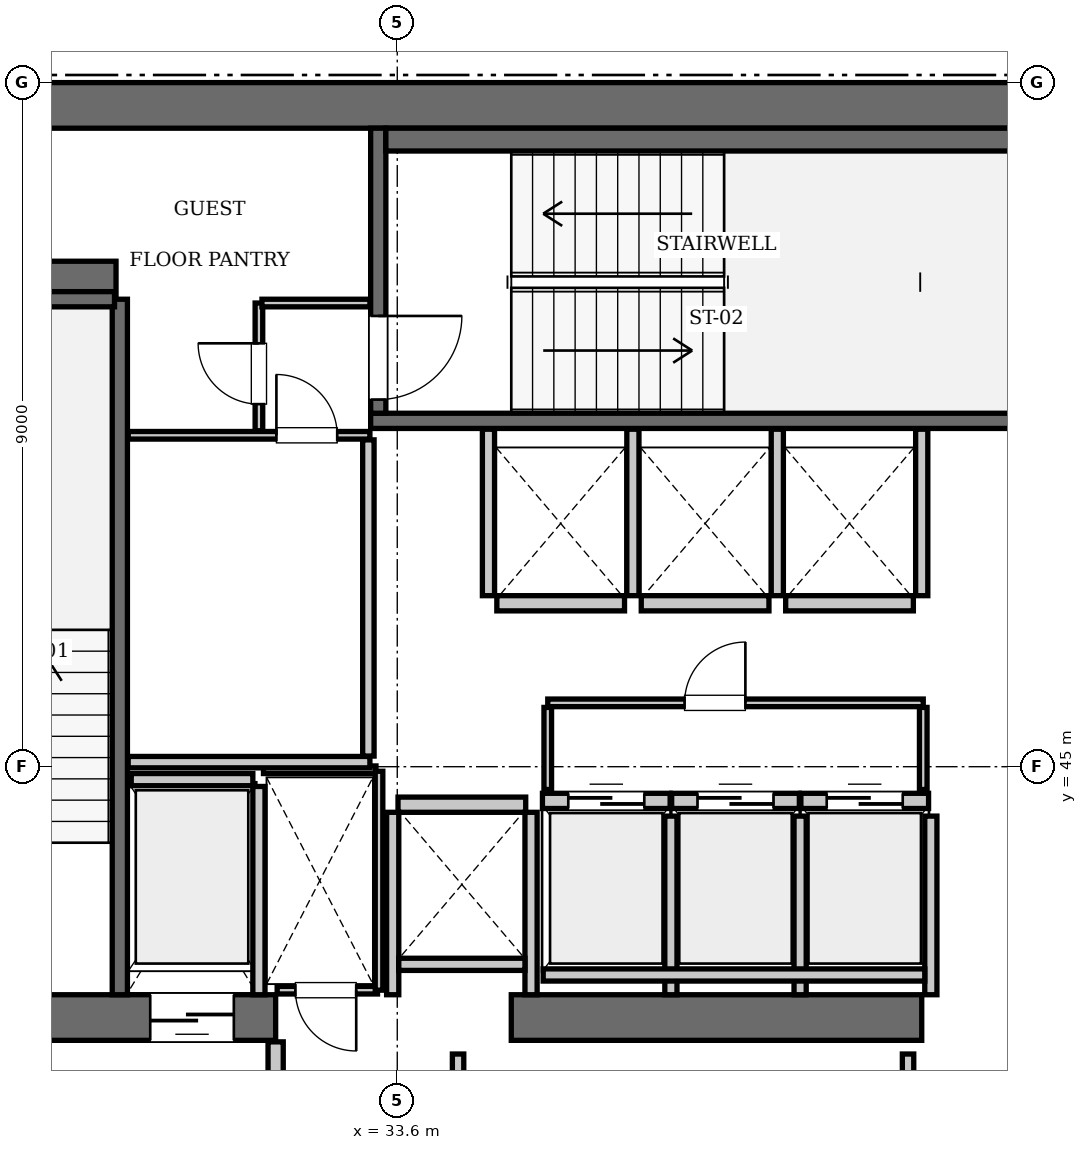
"""IFC4 building model, lengths in metres.
Left out: names, types, materials, properties, quantities, classifications, styles, units other than length and angle.
Written with IfcOpenShell. Run it as: python <this file> out.ifc"""

import sys

from ifc_helpers import new_model, si_unit, direction, frame, frame_2d, origin, place, context, subcontext, project, spatial, rectangle, extrude, element, fill, save


model = new_model("IFC4")
c1 = context("Model", 3, precision=1e-05, world=origin(), true_north=direction((0.0, 1.0)))
c2 = subcontext(c1, "Body", "Model", "MODEL_VIEW")
j1 = project(units=[si_unit("LENGTHUNIT", "METRE"), si_unit("PLANEANGLEUNIT", "RADIAN")], contexts=[c1])
p1 = place(None, origin())
s1 = spatial("IfcSite", under=j1, at=p1, CompositionType="ELEMENT")
p2 = place(p1, origin())
s2 = spatial("IfcBuilding", under=s1, at=p2, CompositionType="ELEMENT")
p3 = place(p2, frame((0.0, 0.0, 258.65)))
s3 = spatial("IfcBuildingStorey", under=s2, at=p3, CompositionType="ELEMENT", Elevation=258.65)
p4 = place(p3, frame((25.2, 53.7, 0.0), z_axis=(0.0, 0.0, 1.0), x_axis=(1.0, 0.0, 0.0)))
e1 = element("IfcWall", 1, at=p4, inside=s3, PredefinedType="SHEAR", context=c2, shape_type="SweptSolid", body=[
    extrude(rectangle(XDim=25.2, YDim=0.6, at=frame_2d((12.6, 0.0))), origin(), (0.0, 0.0, 1.0), 3.85),
])
p5 = place(p3, frame((25.2, 41.7, 0.0), z_axis=(0.0, 0.0, 1.0), x_axis=(1.0, 0.0, 0.0)))
e2 = element("IfcWall", 2, at=p5, inside=s3, PredefinedType="SHEAR", context=c2, shape_type="SweptSolid", body=[
    extrude(rectangle(XDim=6.8, YDim=0.6, at=frame_2d((3.4, 0.0))), origin(), (0.0, 0.0, 1.0), 3.85),
])
p6 = place(p5, frame((1.65, 0.0, 0.0)))
e3 = element("IfcOpeningElement", 3, at=p6, cuts=e2, PredefinedType="OPENING", context=c2, shape_type="SweptSolid", body=[
    extrude(rectangle(XDim=1.15, YDim=2.15, at=frame_2d((0.575, 1.075))), frame((0.0, 0.31, 0.0), z_axis=(0.0, -1.0, 0.0), x_axis=(1.0, 0.0, 0.0)), (0.0, 0.0, 1.0), 0.62),
])
p7 = place(p5, frame((5.15, 0.0, 0.0)))
e4 = element("IfcOpeningElement", 4, at=p7, cuts=e2, PredefinedType="OPENING", context=c2, shape_type="SweptSolid", body=[
    extrude(rectangle(XDim=1.1, YDim=2.2, at=frame_2d((0.55, 1.1))), frame((0.0, 0.31, 0.0), z_axis=(0.0, -1.0, 0.0), x_axis=(1.0, 0.0, 0.0)), (0.0, 0.0, 1.0), 0.62),
])
p8 = place(p3, frame((35.1, 41.7, 0.0), z_axis=(0.0, 0.0, 1.0), x_axis=(1.0, 0.0, 0.0)))
e5 = element("IfcWall", 5, at=p8, inside=s3, PredefinedType="SHEAR", context=c2, shape_type="SweptSolid", body=[
    extrude(rectangle(XDim=5.4, YDim=0.6, at=frame_2d((2.7, 0.0))), origin(), (0.0, 0.0, 1.0), 3.85),
])
p9 = place(p3, frame((25.8, 51.4, 0.0), z_axis=(0.0, 0.0, 1.0), x_axis=(1.0, 0.0, 0.0)))
e6 = element("IfcWall", 6, at=p9, inside=s3, PredefinedType="SHEAR", context=c2, shape_type="SweptSolid", body=[
    extrude(rectangle(XDim=4.1, YDim=0.5, at=frame_2d((2.05, 0.0))), origin(), (0.0, 0.0, 1.0), 3.85),
])
p10 = place(p3, frame((29.95, 42.0, 0.0), z_axis=(0.0, 0.0, 1.0), x_axis=(0.0, 1.0, 0.0)))
e7 = element("IfcWall", 7, at=p10, inside=s3, PredefinedType="SOLIDWALL", context=c2, shape_type="SweptSolid", body=[
    extrude(rectangle(XDim=9.15, YDim=0.2, at=frame_2d((4.575, 0.0))), origin(), (0.0, 0.0, 1.0), 3.61),
])
p11 = place(p3, frame((26.38, 51.15, 0.0), z_axis=(0.0, 0.0, 1.0), x_axis=(1.0, 0.0, 0.0)))
e8 = element("IfcWall", 8, at=p11, inside=s3, PredefinedType="SOLIDWALL", context=c2, shape_type="SweptSolid", body=[
    extrude(rectangle(XDim=3.5, YDim=0.2, at=frame_2d((1.75, 0.0))), origin(), (0.0, 0.0, 1.0), 3.61),
])
p12 = place(p3, frame((33.25, 49.55, 0.0), z_axis=(0.0, 0.0, 1.0), x_axis=(1.0, 0.0, 0.0)))
e9 = element("IfcWall", 9, at=p12, inside=s3, PredefinedType="SOLIDWALL", context=c2, shape_type="SweptSolid", body=[
    extrude(rectangle(XDim=9.1, YDim=0.2, at=frame_2d((4.55, 0.0))), origin(), (0.0, 0.0, 1.0), 3.61),
])
p13 = place(p3, frame((33.35, 49.65, 0.0), z_axis=(0.0, 0.0, 1.0), x_axis=(0.0, 1.0, 0.0)))
e10 = element("IfcWall", 10, at=p13, inside=s3, PredefinedType="SOLIDWALL", context=c2, shape_type="SweptSolid", body=[
    extrude(rectangle(XDim=3.75, YDim=0.2, at=frame_2d((1.875, 0.0))), origin(), (0.0, 0.0, 1.0), 3.61),
])
p14 = place(p13, frame((0.18, 0.0, 0.0)))
e11 = element("IfcOpeningElement", 11, at=p14, cuts=e10, PredefinedType="OPENING", context=c2, shape_type="SweptSolid", body=[
    extrude(rectangle(XDim=1.1, YDim=2.15, at=frame_2d((0.55, 1.075))), frame((0.0, 0.11, 0.0), z_axis=(0.0, -1.0, 0.0), x_axis=(1.0, 0.0, 0.0)), (0.0, 0.0, 1.0), 0.22),
])
p15 = place(p3, frame((33.45, 53.25, 0.0), z_axis=(0.0, 0.0, 1.0), x_axis=(1.0, 0.0, 0.0)))
e12 = element("IfcWall", 12, at=p15, inside=s3, PredefinedType="SOLIDWALL", context=c2, shape_type="SweptSolid", body=[
    extrude(rectangle(XDim=8.7, YDim=0.3, at=frame_2d((4.35, 0.0))), origin(), (0.0, 0.0, 1.0), 3.61),
])
p16 = place(p3, frame((35.51, 44.55, 0.0), z_axis=(0.0, 0.0, 1.0), x_axis=(1.0, 0.0, 0.0)))
e13 = element("IfcWall", 13, at=p16, inside=s3, PredefinedType="SOLIDWALL", context=c2, shape_type="SweptSolid", body=[
    extrude(rectangle(XDim=1.68, YDim=0.2, at=frame_2d((0.84, 0.0))), origin(), (0.0, 0.0, 1.0), 3.61),
])
p17 = place(p16, frame((0.34, 0.0, 0.0)))
e14 = element("IfcOpeningElement", 14, at=p17, cuts=e13, PredefinedType="OPENING", context=c2, shape_type="SweptSolid", body=[
    extrude(rectangle(XDim=1.0, YDim=2.15, at=frame_2d((0.5, 1.075))), frame((0.0, 0.11, 0.0), z_axis=(0.0, -1.0, 0.0), x_axis=(1.0, 0.0, 0.0)), (0.0, 0.0, 1.0), 0.22),
])
p18 = place(p3, frame((37.21, 44.55, 0.0), z_axis=(0.0, 0.0, 1.0), x_axis=(1.0, 0.0, 0.0)))
e15 = element("IfcWall", 15, at=p18, inside=s3, PredefinedType="SOLIDWALL", context=c2, shape_type="SweptSolid", body=[
    extrude(rectangle(XDim=1.68, YDim=0.2, at=frame_2d((0.84, 0.0))), origin(), (0.0, 0.0, 1.0), 3.61),
])
p19 = place(p18, frame((0.34, 0.0, 0.0)))
e16 = element("IfcOpeningElement", 16, at=p19, cuts=e15, PredefinedType="OPENING", context=c2, shape_type="SweptSolid", body=[
    extrude(rectangle(XDim=1.0, YDim=2.15, at=frame_2d((0.5, 1.075))), frame((0.0, 0.11, 0.0), z_axis=(0.0, -1.0, 0.0), x_axis=(1.0, 0.0, 0.0)), (0.0, 0.0, 1.0), 0.22),
])
p20 = place(p3, frame((38.91, 44.55, 0.0), z_axis=(0.0, 0.0, 1.0), x_axis=(1.0, 0.0, 0.0)))
e17 = element("IfcWall", 17, at=p20, inside=s3, PredefinedType="SOLIDWALL", context=c2, shape_type="SweptSolid", body=[
    extrude(rectangle(XDim=1.68, YDim=0.2, at=frame_2d((0.84, 0.0))), origin(), (0.0, 0.0, 1.0), 3.61),
])
p21 = place(p20, frame((0.34, 0.0, 0.0)))
e18 = element("IfcOpeningElement", 18, at=p21, cuts=e17, PredefinedType="OPENING", context=c2, shape_type="SweptSolid", body=[
    extrude(rectangle(XDim=1.0, YDim=2.15, at=frame_2d((0.5, 1.075))), frame((0.0, 0.11, 0.0), z_axis=(0.0, -1.0, 0.0), x_axis=(1.0, 0.0, 0.0)), (0.0, 0.0, 1.0), 0.22),
])
p22 = place(p3, frame((34.91, 47.15, 0.0), z_axis=(0.0, 0.0, 1.0), x_axis=(1.0, 0.0, 0.0)))
e19 = element("IfcWall", 19, at=p22, inside=s3, PredefinedType="SOLIDWALL", context=c2, shape_type="SweptSolid", body=[
    extrude(rectangle(XDim=1.68, YDim=0.2, at=frame_2d((0.84, 0.0))), origin(), (0.0, 0.0, 1.0), 3.61),
])
for number, where, z_axis, x_axis in (
    (20, (36.81, 47.15, 0.0), (0.0, 0.0, 1.0), (1.0, 0.0, 0.0)),
    (21, (38.71, 47.15, 0.0), (0.0, 0.0, 1.0), (1.0, 0.0, 0.0)),
    (22, (33.61, 44.5, 0.0), (0.0, 0.0, 1.0), (1.0, 0.0, 0.0)),
):
    element("IfcWall", number, at=place(p3, frame(where, z_axis=z_axis, x_axis=x_axis)), inside=s3, PredefinedType="SOLIDWALL", context=c2, shape_type="SweptSolid", body=[
        extrude(rectangle(XDim=1.68, YDim=0.2, at=frame_2d((0.84, 0.0))), origin(), (0.0, 0.0, 1.0), 3.61),
    ])
p23 = place(p3, frame((30.1, 44.83, 0.0), z_axis=(0.0, 0.0, 1.0), x_axis=(1.0, 0.0, 0.0)))
e23 = element("IfcWall", 23, at=p23, inside=s3, PredefinedType="SOLIDWALL", context=c2, shape_type="SweptSolid", body=[
    extrude(rectangle(XDim=1.6, YDim=0.16, at=frame_2d((0.8, 0.0))), origin(), (0.0, 0.0, 1.0), 3.61),
])
p24 = place(p3, frame((31.78, 42.0, 0.0), z_axis=(0.0, 0.0, 1.0), x_axis=(0.0, 1.0, 0.0)))
e24 = element("IfcWall", 24, at=p24, inside=s3, PredefinedType="SOLIDWALL", context=c2, shape_type="SweptSolid", body=[
    extrude(rectangle(XDim=2.74, YDim=0.16, at=frame_2d((1.37, 0.0))), origin(), (0.0, 0.0, 1.0), 3.61),
])
for number, where, z_axis, x_axis in (
    (25, (37.2, 42.0, 0.0), (0.0, 0.0, 1.0), (0.0, 1.0, 0.0)),
    (26, (38.9, 42.0, 0.0), (0.0, 0.0, 1.0), (0.0, 1.0, 0.0)),
    (27, (40.62, 42.0, 0.0), (0.0, 0.0, 1.0), (0.0, 1.0, 0.0)),
):
    element("IfcWall", number, at=place(p3, frame(where, z_axis=z_axis, x_axis=x_axis)), inside=s3, PredefinedType="SOLIDWALL", context=c2, shape_type="SweptSolid", body=[
        extrude(rectangle(XDim=2.35, YDim=0.16, at=frame_2d((1.175, 0.0))), origin(), (0.0, 0.0, 1.0), 3.61),
    ])
p25 = place(p3, frame((35.52, 42.26, 0.0), z_axis=(0.0, 0.0, 1.0), x_axis=(1.0, 0.0, 0.0)))
e28 = element("IfcWall", 28, at=p25, inside=s3, PredefinedType="SOLIDWALL", context=c2, shape_type="SweptSolid", body=[
    extrude(rectangle(XDim=5.02, YDim=0.16, at=frame_2d((2.51, 0.0))), origin(), (0.0, 0.0, 1.0), 3.61),
])
for number, where, z_axis, x_axis in (
    (29, (34.8, 47.25, 0.0), (0.0, 0.0, 1.0), (0.0, 1.0, 0.0)),
    (30, (36.7, 47.25, 0.0), (0.0, 0.0, 1.0), (0.0, 1.0, 0.0)),
    (31, (38.6, 47.25, 0.0), (0.0, 0.0, 1.0), (0.0, 1.0, 0.0)),
    (32, (40.5, 47.25, 0.0), (0.0, 0.0, 1.0), (0.0, 1.0, 0.0)),
):
    element("IfcWall", number, at=place(p3, frame(where, z_axis=z_axis, x_axis=x_axis)), inside=s3, PredefinedType="SOLIDWALL", context=c2, shape_type="SweptSolid", body=[
        extrude(rectangle(XDim=2.19, YDim=0.16, at=frame_2d((1.095, 0.0))), origin(), (0.0, 0.0, 1.0), 3.61),
    ])
for number, where, z_axis, x_axis in (
    (33, (33.54, 42.0, 0.0), (0.0, 0.0, 1.0), (0.0, 1.0, 0.0)),
    (34, (35.36, 42.0, 0.0), (0.0, 0.0, 1.0), (0.0, 1.0, 0.0)),
):
    element("IfcWall", number, at=place(p3, frame(where, z_axis=z_axis, x_axis=x_axis)), inside=s3, PredefinedType="SOLIDWALL", context=c2, shape_type="SweptSolid", body=[
        extrude(rectangle(XDim=2.4, YDim=0.16, at=frame_2d((1.2, 0.0))), origin(), (0.0, 0.0, 1.0), 3.61),
    ])
p26 = place(p3, frame((33.62, 42.4, 0.0), z_axis=(0.0, 0.0, 1.0), x_axis=(1.0, 0.0, 0.0)))
e35 = element("IfcWall", 35, at=p26, inside=s3, PredefinedType="SOLIDWALL", context=c2, shape_type="SweptSolid", body=[
    extrude(rectangle(XDim=1.66, YDim=0.16, at=frame_2d((0.83, 0.0))), origin(), (0.0, 0.0, 1.0), 3.61),
])
p27 = place(p3, frame((32.0, 38.31, 0.0), z_axis=(0.0, 0.0, 1.0), x_axis=(0.0, 1.0, 0.0)))
e36 = element("IfcWall", 36, at=p27, inside=s3, PredefinedType="PARTITIONING", context=c2, shape_type="SweptSolid", body=[
    extrude(rectangle(XDim=3.07, YDim=0.2, at=frame_2d((1.535, 0.0))), origin(), (0.0, 0.0, 1.0), 3.61),
])
p28 = place(p3, frame((32.02, 42.06, 0.0), z_axis=(0.0, 0.0, 1.0), x_axis=(1.0, 0.0, 0.0)))
e37 = element("IfcWall", 37, at=p28, inside=s3, PredefinedType="PARTITIONING", context=c2, shape_type="SweptSolid", body=[
    extrude(rectangle(XDim=1.32, YDim=0.1, at=frame_2d((0.66, 0.0))), origin(), (0.0, 0.0, 1.0), 3.61),
])
p29 = place(p28, frame((0.24, 0.0, 0.0)))
e38 = element("IfcOpeningElement", 38, at=p29, cuts=e37, PredefinedType="OPENING", context=c2, shape_type="SweptSolid", body=[
    extrude(rectangle(XDim=0.8, YDim=2.05, at=frame_2d((0.4, 1.025))), frame((0.0, 0.06, 0.0), z_axis=(0.0, -1.0, 0.0), x_axis=(1.0, 0.0, 0.0)), (0.0, 0.0, 1.0), 0.12),
])
p30 = place(p3, frame((31.84, 44.96, 0.0), z_axis=(0.0, 0.0, 1.0), x_axis=(1.0, 0.0, 0.0)))
e39 = element("IfcWall", 39, at=p30, inside=s3, PredefinedType="PARTITIONING", context=c2, shape_type="SweptSolid", body=[
    extrude(rectangle(XDim=1.48, YDim=0.1, at=frame_2d((0.74, 0.0))), origin(), (0.0, 0.0, 1.0), 3.61),
])
p31 = place(p3, frame((33.36, 42.06, 0.0), z_axis=(0.0, 0.0, 1.0), x_axis=(0.0, 1.0, 0.0)))
e40 = element("IfcWall", 40, at=p31, inside=s3, PredefinedType="PARTITIONING", context=c2, shape_type="SweptSolid", body=[
    extrude(rectangle(XDim=2.88, YDim=0.1, at=frame_2d((1.44, 0.0))), origin(), (0.0, 0.0, 1.0), 3.61),
])
p32 = place(p3, frame((35.58, 45.84, 0.0), z_axis=(0.0, 0.0, 1.0), x_axis=(1.0, 0.0, 0.0)))
e41 = element("IfcWall", 41, at=p32, inside=s3, PredefinedType="PARTITIONING", context=c2, shape_type="SweptSolid", body=[
    extrude(rectangle(XDim=4.94, YDim=0.1, at=frame_2d((2.47, 0.0))), origin(), (0.0, 0.0, 1.0), 3.61),
])
p33 = place(p32, frame((1.8, 0.0, 0.0)))
e42 = element("IfcOpeningElement", 42, at=p33, cuts=e41, PredefinedType="OPENING", context=c2, shape_type="SweptSolid", body=[
    extrude(rectangle(XDim=0.8, YDim=2.05, at=frame_2d((0.4, 1.025))), frame((0.0, 0.06, 0.0), z_axis=(0.0, -1.0, 0.0), x_axis=(1.0, 0.0, 0.0)), (0.0, 0.0, 1.0), 0.12),
])
for number, where, z_axis, x_axis in (
    (43, (35.58, 44.7, 0.0), (0.0, 0.0, 1.0), (0.0, 1.0, 0.0)),
    (44, (40.52, 44.7, 0.0), (0.0, 0.0, 1.0), (0.0, 1.0, 0.0)),
):
    element("IfcWall", number, at=place(p3, frame(where, z_axis=z_axis, x_axis=x_axis)), inside=s3, PredefinedType="PARTITIONING", context=c2, shape_type="SweptSolid", body=[
        extrude(rectangle(XDim=1.08, YDim=0.1, at=frame_2d((0.54, 0.0))), origin(), (0.0, 0.0, 1.0), 3.61),
    ])
p34 = place(p3, frame((30.06, 45.06, 0.0), z_axis=(0.0, 0.0, 1.0), x_axis=(1.0, 0.0, 0.0)))
e45 = element("IfcWall", 45, at=p34, inside=s3, PredefinedType="PARTITIONING", context=c2, shape_type="SweptSolid", body=[
    extrude(rectangle(XDim=3.18, YDim=0.15, at=frame_2d((1.59, 0.0))), origin(), (0.0, 0.0, 1.0), 3.61),
])
p35 = place(p3, frame((33.22, 45.14, 0.0), z_axis=(0.0, 0.0, 1.0), x_axis=(0.0, 1.0, 0.0)))
e46 = element("IfcWall", 46, at=p35, inside=s3, PredefinedType="PARTITIONING", context=c2, shape_type="SweptSolid", body=[
    extrude(rectangle(XDim=4.16, YDim=0.15, at=frame_2d((2.08, 0.0))), origin(), (0.0, 0.0, 1.0), 3.61),
])
p36 = place(p3, frame((30.06, 49.36, 0.0), z_axis=(0.0, 0.0, 1.0), x_axis=(1.0, 0.0, 0.0)))
e47 = element("IfcWall", 47, at=p36, inside=s3, PredefinedType="PARTITIONING", context=c2, shape_type="SweptSolid", body=[
    extrude(rectangle(XDim=3.18, YDim=0.1, at=frame_2d((1.59, 0.0))), origin(), (0.0, 0.0, 1.0), 3.61),
])
p37 = place(p36, frame((1.95, 0.0, 0.0)))
e48 = element("IfcOpeningElement", 48, at=p37, cuts=e47, PredefinedType="OPENING", context=c2, shape_type="SweptSolid", body=[
    extrude(rectangle(XDim=0.8, YDim=2.05, at=frame_2d((0.4, 1.025))), frame((0.0, 0.06, 0.0), z_axis=(0.0, -1.0, 0.0), x_axis=(1.0, 0.0, 0.0)), (0.0, 0.0, 1.0), 0.12),
])
p38 = place(p3, frame((31.78, 49.42, 0.0), z_axis=(0.0, 0.0, 1.0), x_axis=(0.0, 1.0, 0.0)))
e49 = element("IfcWall", 49, at=p38, inside=s3, PredefinedType="PARTITIONING", context=c2, shape_type="SweptSolid", body=[
    extrude(rectangle(XDim=1.68, YDim=0.1, at=frame_2d((0.84, 0.0))), origin(), (0.0, 0.0, 1.0), 3.61),
])
p39 = place(p38, frame((0.35, 0.0, 0.0)))
e50 = element("IfcOpeningElement", 50, at=p39, cuts=e49, PredefinedType="OPENING", context=c2, shape_type="SweptSolid", body=[
    extrude(rectangle(XDim=0.8, YDim=2.05, at=frame_2d((0.4, 1.025))), frame((0.0, 0.06, 0.0), z_axis=(0.0, -1.0, 0.0), x_axis=(1.0, 0.0, 0.0)), (0.0, 0.0, 1.0), 0.12),
])
p40 = place(p3, frame((31.82, 51.1, 0.0), z_axis=(0.0, 0.0, 1.0), x_axis=(1.0, 0.0, 0.0)))
e51 = element("IfcWall", 51, at=p40, inside=s3, PredefinedType="PARTITIONING", context=c2, shape_type="SweptSolid", body=[
    extrude(rectangle(XDim=1.42, YDim=0.1, at=frame_2d((0.71, 0.0))), origin(), (0.0, 0.0, 1.0), 3.61),
])
for number, where, z_axis, x_axis in (
    (52, (34.4, 38.38, 0.0), (0.0, 0.0, 1.0), (0.0, 1.0, 0.0)),
    (53, (40.32, 38.38, 0.0), (0.0, 0.0, 1.0), (0.0, 1.0, 0.0)),
):
    element("IfcWall", number, at=place(p3, frame(where, z_axis=z_axis, x_axis=x_axis)), inside=s3, PredefinedType="PARTITIONING", context=c2, shape_type="SweptSolid", body=[
        extrude(rectangle(XDim=2.84, YDim=0.15, at=frame_2d((1.42, 0.0))), origin(), (0.0, 0.0, 1.0), 3.61),
    ])
p41 = place(p14, frame((1.1, 0.0, 0.0), z_axis=(0.0, 0.0, 1.0), x_axis=(-1.0, 0.0, 0.0)))
e54 = element("IfcDoor", 54, at=p41, inside=s3, OperationType="SINGLE_SWING_LEFT", PredefinedType="DOOR", context=c2, shape_type="SweptSolid", body=[
    extrude(rectangle(XDim=1.1, YDim=2.15, at=frame_2d((0.55, 1.075))), frame((0.0, 0.025, 0.0), z_axis=(0.0, -1.0, 0.0), x_axis=(1.0, 0.0, 0.0)), (0.0, 0.0, 1.0), 0.05),
])
fill(e11, e54)
p42 = place(p17, origin())
e55 = element("IfcDoor", 55, at=p42, inside=s3, OperationType="SLIDING_TO_LEFT", PredefinedType="DOOR", context=c2, shape_type="SweptSolid", body=[
    extrude(rectangle(XDim=1.0, YDim=2.15, at=frame_2d((0.5, 1.075))), frame((0.0, 0.025, 0.0), z_axis=(0.0, -1.0, 0.0), x_axis=(1.0, 0.0, 0.0)), (0.0, 0.0, 1.0), 0.05),
])
fill(e14, e55)
p43 = place(p19, origin())
e56 = element("IfcDoor", 56, at=p43, inside=s3, OperationType="SLIDING_TO_LEFT", PredefinedType="DOOR", context=c2, shape_type="SweptSolid", body=[
    extrude(rectangle(XDim=1.0, YDim=2.15, at=frame_2d((0.5, 1.075))), frame((0.0, 0.025, 0.0), z_axis=(0.0, -1.0, 0.0), x_axis=(1.0, 0.0, 0.0)), (0.0, 0.0, 1.0), 0.05),
])
fill(e16, e56)
p44 = place(p21, origin())
e57 = element("IfcDoor", 57, at=p44, inside=s3, OperationType="SLIDING_TO_LEFT", PredefinedType="DOOR", context=c2, shape_type="SweptSolid", body=[
    extrude(rectangle(XDim=1.0, YDim=2.15, at=frame_2d((0.5, 1.075))), frame((0.0, 0.025, 0.0), z_axis=(0.0, -1.0, 0.0), x_axis=(1.0, 0.0, 0.0)), (0.0, 0.0, 1.0), 0.05),
])
fill(e18, e57)
p45 = place(p7, frame((1.1, 0.0, 0.0), z_axis=(0.0, 0.0, 1.0), x_axis=(-1.0, 0.0, 0.0)))
e58 = element("IfcDoor", 58, at=p45, inside=s3, OperationType="SLIDING_TO_LEFT", PredefinedType="DOOR", context=c2, shape_type="SweptSolid", body=[
    extrude(rectangle(XDim=1.1, YDim=2.2, at=frame_2d((0.55, 1.1))), frame((0.0, 0.025, 0.0), z_axis=(0.0, -1.0, 0.0), x_axis=(1.0, 0.0, 0.0)), (0.0, 0.0, 1.0), 0.05),
])
fill(e4, e58)
p46 = place(p29, frame((0.8, 0.0, 0.0), z_axis=(0.0, 0.0, 1.0), x_axis=(-1.0, 0.0, 0.0)))
e59 = element("IfcDoor", 59, at=p46, inside=s3, OperationType="SINGLE_SWING_LEFT", PredefinedType="DOOR", context=c2, shape_type="SweptSolid", body=[
    extrude(rectangle(XDim=0.8, YDim=2.05, at=frame_2d((0.4, 1.025))), frame((0.0, 0.025, 0.0), z_axis=(0.0, -1.0, 0.0), x_axis=(1.0, 0.0, 0.0)), (0.0, 0.0, 1.0), 0.05),
])
fill(e38, e59)
p47 = place(p33, origin())
e60 = element("IfcDoor", 60, at=p47, inside=s3, OperationType="SINGLE_SWING_RIGHT", PredefinedType="DOOR", context=c2, shape_type="SweptSolid", body=[
    extrude(rectangle(XDim=0.8, YDim=2.05, at=frame_2d((0.4, 1.025))), frame((0.0, 0.025, 0.0), z_axis=(0.0, -1.0, 0.0), x_axis=(1.0, 0.0, 0.0)), (0.0, 0.0, 1.0), 0.05),
])
fill(e42, e60)
p48 = place(p37, origin())
e61 = element("IfcDoor", 61, at=p48, inside=s3, OperationType="SINGLE_SWING_LEFT", PredefinedType="DOOR", context=c2, shape_type="SweptSolid", body=[
    extrude(rectangle(XDim=0.8, YDim=2.05, at=frame_2d((0.4, 1.025))), frame((0.0, 0.025, 0.0), z_axis=(0.0, -1.0, 0.0), x_axis=(1.0, 0.0, 0.0)), (0.0, 0.0, 1.0), 0.05),
])
fill(e48, e61)
p49 = place(p39, origin())
e62 = element("IfcDoor", 62, at=p49, inside=s3, OperationType="SINGLE_SWING_RIGHT", PredefinedType="DOOR", context=c2, shape_type="SweptSolid", body=[
    extrude(rectangle(XDim=0.8, YDim=2.05, at=frame_2d((0.4, 1.025))), frame((0.0, 0.025, 0.0), z_axis=(0.0, -1.0, 0.0), x_axis=(1.0, 0.0, 0.0)), (0.0, 0.0, 1.0), 0.05),
])
fill(e50, e62)
save(model, sys.argv[1])
